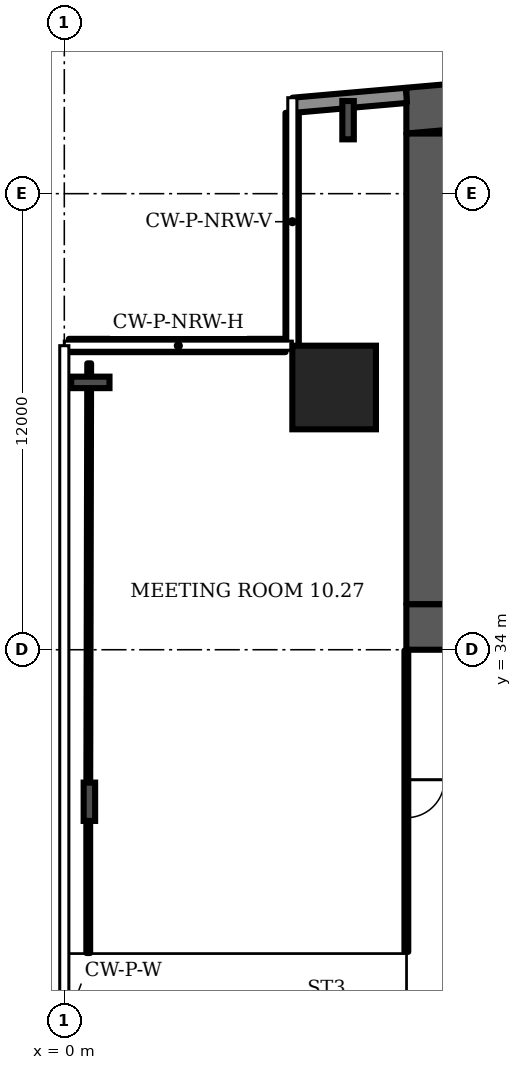
"""IFC4 building model, lengths in metres.
Left out: names, types, materials, properties, quantities, classifications, styles, units other than length and angle.
Written with IfcOpenShell. Run it as: python <this file> out.ifc"""

import sys

from ifc_helpers import new_model, si_unit, direction, frame, frame_2d, origin, origin_2d, place, context, subcontext, project, spatial, polyline, rectangle, i_section, outline, extrude, element, fill, save


model = new_model("IFC4")
c1 = context("Model", 3, precision=1e-05, world=origin(), true_north=direction((0.0, 1.0)))
c2 = subcontext(c1, "Body", "Model", "MODEL_VIEW")
j1 = project(units=[si_unit("LENGTHUNIT", "METRE"), si_unit("PLANEANGLEUNIT", "RADIAN")], contexts=[c1])
p1 = place(None, origin())
s1 = spatial("IfcSite", under=j1, at=p1, CompositionType="ELEMENT")
p2 = place(p1, origin())
s2 = spatial("IfcBuilding", under=s1, at=p2, CompositionType="ELEMENT")
p3 = place(p2, frame((0.0, 0.0, 55.9)))
s3 = spatial("IfcBuildingStorey", under=s2, at=p3, CompositionType="ELEMENT", Elevation=55.9)
p4 = place(p3, origin())
e1 = element("IfcWall", 1, at=p4, inside=s3, PredefinedType="SHEAR", context=c2, shape_type="SweptSolid", body=[
    extrude(outline(polyline([(9.0, 47.583), (37.0, 50.032), (65.0, 47.583), (65.0, 48.787), (37.0, 51.237), (9.0, 48.787), (9.0, 47.583)])), origin(), (0.0, 0.0, 1.0), 3.6),
])
p5 = place(p3, frame((9.0, 34.6, 0.0), z_axis=(0.0, 0.0, 1.0), x_axis=(1.0, 0.0, 0.0)))
e2 = element("IfcWall", 2, at=p5, inside=s3, PredefinedType="SHEAR", context=c2, shape_type="SweptSolid", body=[
    extrude(rectangle(XDim=56.0, YDim=1.2, at=frame_2d((28.0, 0.0))), origin(), (0.0, 0.0, 1.0), 3.6),
])
p6 = place(p5, frame((3.3, 0.0, 0.0)))
e3 = element("IfcOpeningElement", 3, at=p6, cuts=e2, PredefinedType="OPENING", context=c2, shape_type="SweptSolid", body=[
    extrude(rectangle(XDim=1.0, YDim=2.1, at=frame_2d((0.5, 1.05))), frame((0.0, 0.61, 0.0), z_axis=(0.0, -1.0, 0.0), x_axis=(1.0, 0.0, 0.0)), (0.0, 0.0, 1.0), 1.22),
])
p7 = place(p5, frame((7.867, 0.0, 0.0)))
e4 = element("IfcOpeningElement", 4, at=p7, cuts=e2, PredefinedType="OPENING", context=c2, shape_type="SweptSolid", body=[
    extrude(rectangle(XDim=1.1, YDim=2.1, at=frame_2d((0.55, 1.05))), frame((0.0, 0.61, 0.0), z_axis=(0.0, -1.0, 0.0), x_axis=(1.0, 0.0, 0.0)), (0.0, 0.0, 1.0), 1.22),
])
p8 = place(p5, frame((12.033, 0.0, 0.0)))
e5 = element("IfcOpeningElement", 5, at=p8, cuts=e2, PredefinedType="OPENING", context=c2, shape_type="SweptSolid", body=[
    extrude(rectangle(XDim=1.1, YDim=2.1, at=frame_2d((0.55, 1.05))), frame((0.0, 0.61, 0.0), z_axis=(0.0, -1.0, 0.0), x_axis=(1.0, 0.0, 0.0)), (0.0, 0.0, 1.0), 1.22),
])
p9 = place(p5, frame((9.8, 0.0, 0.0)))
e6 = element("IfcOpeningElement", 6, at=p9, cuts=e2, PredefinedType="OPENING", context=c2, shape_type="SweptSolid", body=[
    extrude(rectangle(XDim=1.4, YDim=2.1, at=frame_2d((0.7, 1.05))), frame((0.0, 0.61, 0.0), z_axis=(0.0, -1.0, 0.0), x_axis=(1.0, 0.0, 0.0)), (0.0, 0.0, 1.0), 1.22),
])
p10 = place(p5, frame((14.65, 0.0, 0.0)))
e7 = element("IfcOpeningElement", 7, at=p10, cuts=e2, PredefinedType="OPENING", context=c2, shape_type="SweptSolid", body=[
    extrude(rectangle(XDim=1.2, YDim=2.1, at=frame_2d((0.6, 1.05))), frame((0.0, 0.61, 0.0), z_axis=(0.0, -1.0, 0.0), x_axis=(1.0, 0.0, 0.0)), (0.0, 0.0, 1.0), 1.22),
])
p11 = place(p5, frame((21.867, 0.0, 0.0)))
e8 = element("IfcOpeningElement", 8, at=p11, cuts=e2, PredefinedType="OPENING", context=c2, shape_type="SweptSolid", body=[
    extrude(rectangle(XDim=1.1, YDim=2.1, at=frame_2d((0.55, 1.05))), frame((0.0, 0.61, 0.0), z_axis=(0.0, -1.0, 0.0), x_axis=(1.0, 0.0, 0.0)), (0.0, 0.0, 1.0), 1.22),
])
p12 = place(p5, frame((26.033, 0.0, 0.0)))
e9 = element("IfcOpeningElement", 9, at=p12, cuts=e2, PredefinedType="OPENING", context=c2, shape_type="SweptSolid", body=[
    extrude(rectangle(XDim=1.1, YDim=2.1, at=frame_2d((0.55, 1.05))), frame((0.0, 0.61, 0.0), z_axis=(0.0, -1.0, 0.0), x_axis=(1.0, 0.0, 0.0)), (0.0, 0.0, 1.0), 1.22),
])
p13 = place(p5, frame((23.8, 0.0, 0.0)))
e10 = element("IfcOpeningElement", 10, at=p13, cuts=e2, PredefinedType="OPENING", context=c2, shape_type="SweptSolid", body=[
    extrude(rectangle(XDim=1.4, YDim=2.1, at=frame_2d((0.7, 1.05))), frame((0.0, 0.61, 0.0), z_axis=(0.0, -1.0, 0.0), x_axis=(1.0, 0.0, 0.0)), (0.0, 0.0, 1.0), 1.22),
])
p14 = place(p5, frame((28.867, 0.0, 0.0)))
e11 = element("IfcOpeningElement", 11, at=p14, cuts=e2, PredefinedType="OPENING", context=c2, shape_type="SweptSolid", body=[
    extrude(rectangle(XDim=1.1, YDim=2.1, at=frame_2d((0.55, 1.05))), frame((0.0, 0.61, 0.0), z_axis=(0.0, -1.0, 0.0), x_axis=(1.0, 0.0, 0.0)), (0.0, 0.0, 1.0), 1.22),
])
p15 = place(p5, frame((33.033, 0.0, 0.0)))
e12 = element("IfcOpeningElement", 12, at=p15, cuts=e2, PredefinedType="OPENING", context=c2, shape_type="SweptSolid", body=[
    extrude(rectangle(XDim=1.1, YDim=2.1, at=frame_2d((0.55, 1.05))), frame((0.0, 0.61, 0.0), z_axis=(0.0, -1.0, 0.0), x_axis=(1.0, 0.0, 0.0)), (0.0, 0.0, 1.0), 1.22),
])
p16 = place(p5, frame((40.15, 0.0, 0.0)))
e13 = element("IfcOpeningElement", 13, at=p16, cuts=e2, PredefinedType="OPENING", context=c2, shape_type="SweptSolid", body=[
    extrude(rectangle(XDim=1.2, YDim=2.1, at=frame_2d((0.6, 1.05))), frame((0.0, 0.61, 0.0), z_axis=(0.0, -1.0, 0.0), x_axis=(1.0, 0.0, 0.0)), (0.0, 0.0, 1.0), 1.22),
])
p17 = place(p5, frame((44.8, 0.0, 0.0)))
e14 = element("IfcOpeningElement", 14, at=p17, cuts=e2, PredefinedType="OPENING", context=c2, shape_type="SweptSolid", body=[
    extrude(rectangle(XDim=1.4, YDim=2.1, at=frame_2d((0.7, 1.05))), frame((0.0, 0.61, 0.0), z_axis=(0.0, -1.0, 0.0), x_axis=(1.0, 0.0, 0.0)), (0.0, 0.0, 1.0), 1.22),
])
p18 = place(p5, frame((49.867, 0.0, 0.0)))
e15 = element("IfcOpeningElement", 15, at=p18, cuts=e2, PredefinedType="OPENING", context=c2, shape_type="SweptSolid", body=[
    extrude(rectangle(XDim=1.1, YDim=2.1, at=frame_2d((0.55, 1.05))), frame((0.0, 0.61, 0.0), z_axis=(0.0, -1.0, 0.0), x_axis=(1.0, 0.0, 0.0)), (0.0, 0.0, 1.0), 1.22),
])
p19 = place(p5, frame((53.5, 0.0, 0.0)))
e16 = element("IfcOpeningElement", 16, at=p19, cuts=e2, PredefinedType="OPENING", context=c2, shape_type="SweptSolid", body=[
    extrude(rectangle(XDim=1.1, YDim=2.1, at=frame_2d((0.55, 1.05))), frame((0.0, 0.61, 0.0), z_axis=(0.0, -1.0, 0.0), x_axis=(1.0, 0.0, 0.0)), (0.0, 0.0, 1.0), 1.22),
])
p20 = place(p5, frame((51.567, 0.0, 0.0)))
e17 = element("IfcOpeningElement", 17, at=p20, cuts=e2, PredefinedType="OPENING", context=c2, shape_type="SweptSolid", body=[
    extrude(rectangle(XDim=1.4, YDim=2.1, at=frame_2d((0.7, 1.05))), frame((0.0, 0.61, 0.0), z_axis=(0.0, -1.0, 0.0), x_axis=(1.0, 0.0, 0.0)), (0.0, 0.0, 1.0), 1.22),
])
p21 = place(p3, frame((9.6, 35.2, 0.0), z_axis=(0.0, 0.0, 1.0), x_axis=(0.0, 1.0, 0.0)))
e18 = element("IfcWall", 18, at=p21, inside=s3, PredefinedType="SHEAR", context=c2, shape_type="SweptSolid", body=[
    extrude(rectangle(XDim=12.383, YDim=1.2, at=frame_2d((6.191, 0.0))), origin(), (0.0, 0.0, 1.0), 3.6),
])
p22 = place(p3, frame((7.1, 40.9, 0.0), z_axis=(0.0, 0.0, 1.0), x_axis=(1.0, 0.0, 0.0)))
e19 = element("IfcColumn", 19, at=p22, inside=s3, PredefinedType="COLUMN", context=c2, shape_type="SweptSolid", body=[
    extrude(rectangle(XDim=2.2, YDim=2.2, at=origin_2d()), origin(), (0.0, 0.0, 1.0), 3.6),
])
for number, where, z_axis, x_axis in (
    (20, (7.467, 47.934, 0.0), (0.0, 0.0, 1.0), (-1.0, 0.0, 0.0)),
    (21, (0.685, 41.034, 0.0), (0.0, 0.0, 1.0), (0.0, 1.0, 0.0)),
    (22, (0.66, 30.0, 0.0), (0.0, 0.0, 1.0), (-1.0, 0.0, 0.0)),
):
    element("IfcColumn", number, at=place(p3, frame(where, z_axis=z_axis, x_axis=x_axis)), inside=s3, PredefinedType="COLUMN", context=c2, shape_type="SweptSolid", body=[
        extrude(i_section(OverallWidth=0.302, OverallDepth=1.008, WebThickness=0.021, FlangeThickness=0.04, FilletRadius=0.03, at=origin_2d()), origin(), (0.0, 0.0, 1.0), 3.6),
    ])
p23 = place(p3, frame((9.0, 48.587, 0.0), z_axis=(0.0, 0.0, 1.0), x_axis=(-0.996194, -0.087168, 0.0)))
e23 = element("IfcWall", 23, at=p23, inside=s3, PredefinedType="SOLIDWALL", context=c2, shape_type="SweptSolid", body=[
    extrude(rectangle(XDim=2.994, YDim=0.4, at=frame_2d((1.497, 0.0))), origin(), (0.0, 0.0, 1.0), 3.2),
])
p24 = place(p3, frame((5.995, 48.126, 0.0), z_axis=(0.0, 0.0, 1.0), x_axis=(0.0, -1.0, 0.0)))
e24 = element("IfcWall", 24, at=p24, inside=s3, PredefinedType="SOLIDWALL", context=c2, shape_type="SweptSolid", body=[
    extrude(rectangle(XDim=6.126, YDim=0.35, at=frame_2d((3.063, 0.0))), origin(), (0.0, 0.0, 1.0), 1.0),
])
p25 = place(p3, frame((5.82, 42.005, 0.0), z_axis=(0.0, 0.0, 1.0), x_axis=(-1.0, 0.0, 0.0)))
e25 = element("IfcWall", 25, at=p25, inside=s3, PredefinedType="SOLIDWALL", context=c2, shape_type="SweptSolid", body=[
    extrude(rectangle(XDim=5.7, YDim=0.35, at=frame_2d((2.85, 0.0))), origin(), (0.0, 0.0, 1.0), 1.0),
])
p26 = place(p3, frame((0.63, 26.02, 0.0), z_axis=(0.0, 0.0, 1.0), x_axis=(0.0, 1.0, 0.0)))
e26 = element("IfcWall", 26, at=p26, inside=s3, PredefinedType="PARTITIONING", context=c2, shape_type="SweptSolid", body=[
    extrude(rectangle(XDim=3.98, YDim=0.1, at=frame_2d((1.99, 0.0))), origin(), (0.0, 0.0, 1.0), 2.58),
])
p27 = place(p3, frame((0.63, 30.0, 0.0), z_axis=(0.0, 0.0, 1.0), x_axis=(0.00218, 0.999994, 0.0)))
e27 = element("IfcWall", 27, at=p27, inside=s3, PredefinedType="PARTITIONING", context=c2, shape_type="SweptSolid", body=[
    extrude(rectangle(XDim=11.535, YDim=0.1, at=frame_2d((5.768, 0.0))), origin(), (0.0, 0.0, 1.0), 2.58),
])
p28 = place(p3, frame((9.0, 26.05, 0.0), z_axis=(0.0, 0.0, 1.0), x_axis=(0.0, 1.0, 0.0)))
e28 = element("IfcWall", 28, at=p28, inside=s3, PredefinedType="PARTITIONING", context=c2, shape_type="SweptSolid", body=[
    extrude(rectangle(XDim=7.93, YDim=0.1, at=frame_2d((3.965, 0.0))), origin(), (0.0, 0.0, 1.0), 3.2),
])
p29 = place(p28, frame((3.53, 0.0, 0.0)))
e29 = element("IfcOpeningElement", 29, at=p29, cuts=e28, PredefinedType="OPENING", context=c2, shape_type="SweptSolid", body=[
    extrude(rectangle(XDim=1.0, YDim=2.1, at=frame_2d((0.5, 1.05))), frame((0.0, 0.06, 0.0), z_axis=(0.0, -1.0, 0.0), x_axis=(1.0, 0.0, 0.0)), (0.0, 0.0, 1.0), 0.12),
])
p30 = place(p29, origin())
e30 = element("IfcDoor", 30, at=p30, inside=s3, OperationType="SINGLE_SWING_RIGHT", PredefinedType="DOOR", context=c2, shape_type="SweptSolid", body=[
    extrude(rectangle(XDim=1.0, YDim=2.1, at=frame_2d((0.5, 1.05))), frame((0.0, 0.025, 0.0), z_axis=(0.0, -1.0, 0.0), x_axis=(1.0, 0.0, 0.0)), (0.0, 0.0, 1.0), 0.05),
])
fill(e29, e30)
save(model, sys.argv[1])
